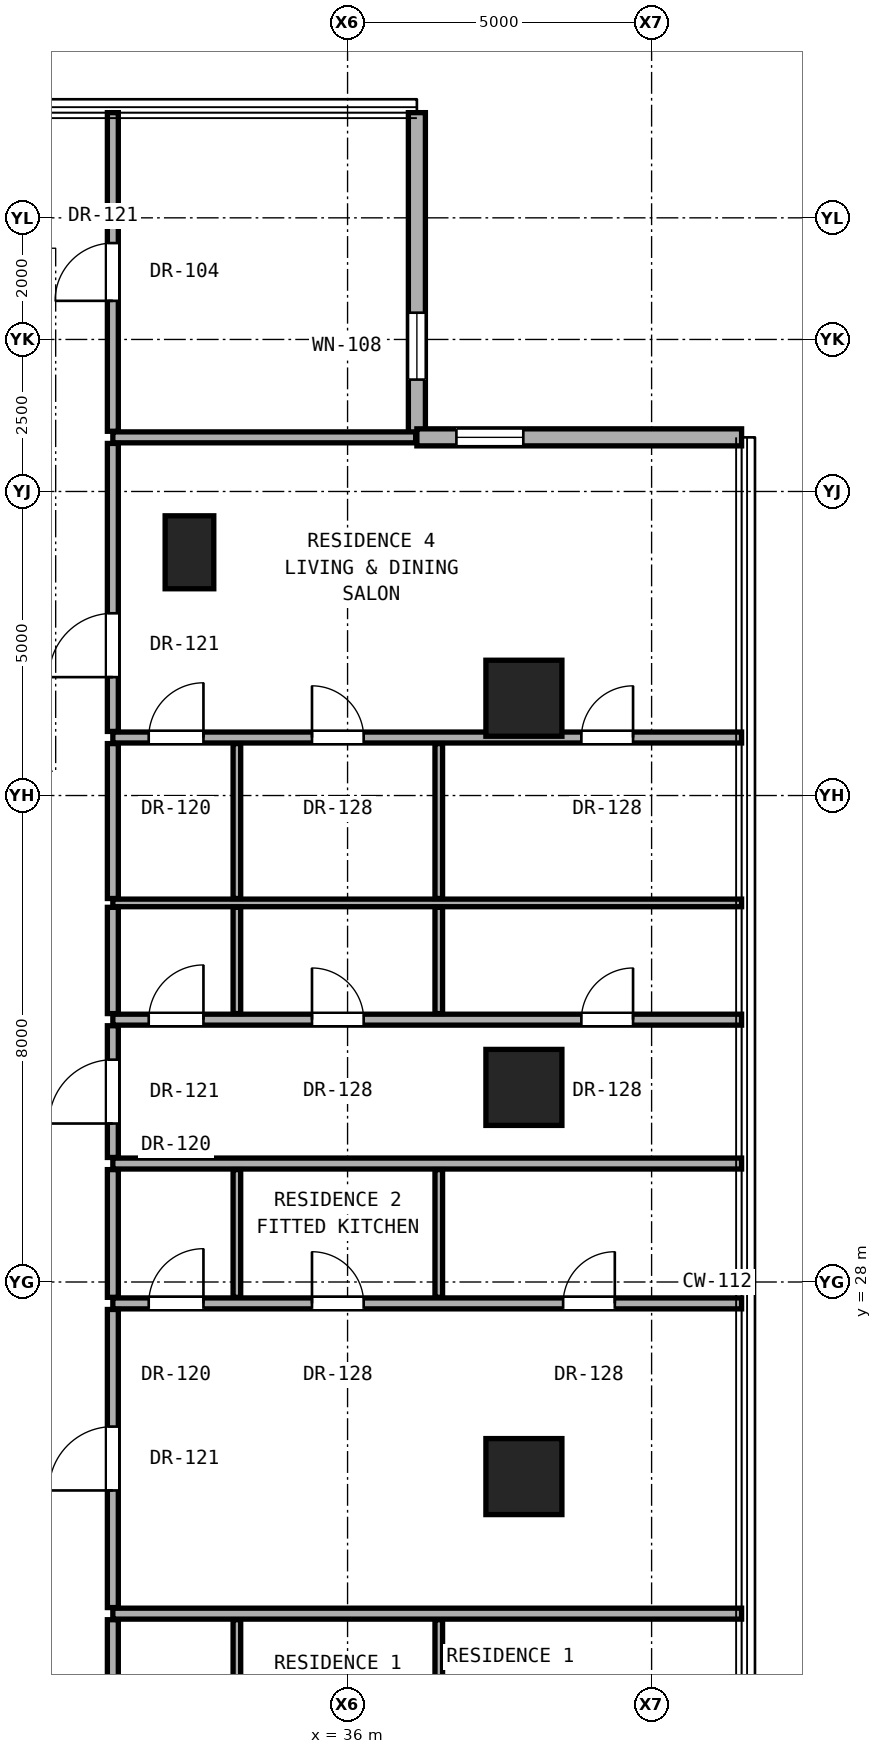
"""IFC4 building model, lengths in metres.
Left out: names, types, materials, properties, quantities, classifications, styles, units other than length and angle.
Written with IfcOpenShell. Run it as: python <this file> out.ifc"""

import sys

from ifc_helpers import new_model, si_unit, direction, frame, frame_2d, origin, origin_2d, place, context, subcontext, project, spatial, rectangle, hollow_rectangle, extrude, element, fill, save


model = new_model("IFC4")
c1 = context("Model", 3, precision=1e-05, world=origin(), true_north=direction((0.0, 1.0)))
c2 = subcontext(c1, "Body", "Model", "MODEL_VIEW")
j1 = project(units=[si_unit("LENGTHUNIT", "METRE"), si_unit("PLANEANGLEUNIT", "RADIAN")], contexts=[c1])
p1 = place(None, origin())
s1 = spatial("IfcSite", under=j1, at=p1, CompositionType="ELEMENT")
p2 = place(p1, origin())
s2 = spatial("IfcBuilding", under=s1, at=p2, CompositionType="ELEMENT")
p3 = place(p2, frame((0.0, 0.0, 68.6)))
s3 = spatial("IfcBuildingStorey", under=s2, at=p3, CompositionType="ELEMENT", Elevation=68.6)
for number, where, z_axis, x_axis in (
    (1, (38.9, 24.8, 0.0), (0.0, 0.0, 1.0), (1.0, 0.0, 0.0)),
    (2, (38.9, 31.2, 0.0), (0.0, 0.0, 1.0), (1.0, 0.0, 0.0)),
    (3, (38.9, 37.6, 0.0), (0.0, 0.0, 1.0), (1.0, 0.0, 0.0)),
):
    element("IfcColumn", number, at=place(p3, frame(where, z_axis=z_axis, x_axis=x_axis)), inside=s3, PredefinedType="COLUMN", context=c2, shape_type="SweptSolid", body=[
        extrude(hollow_rectangle(XDim=1.25, YDim=1.25, WallThickness=0.07, at=origin_2d()), origin(), (0.0, 0.0, 1.0), 3.3),
    ])
p4 = place(p3, frame((33.4, 40.0, 0.0), z_axis=(0.0, 0.0, 1.0), x_axis=(1.0, 0.0, 0.0)))
e4 = element("IfcColumn", 4, at=p4, inside=s3, PredefinedType="PILASTER", context=c2, shape_type="SweptSolid", body=[
    extrude(rectangle(XDim=0.8, YDim=1.2, at=origin_2d()), origin(), (0.0, 0.0, 1.0), 3.3),
])
p5 = place(p3, frame((37.14, 41.89, 0.0), z_axis=(0.0, 0.0, 1.0), x_axis=(0.0, 1.0, 0.0)))
e5 = element("IfcWall", 5, at=p5, inside=s3, PredefinedType="SOLIDWALL", context=c2, shape_type="SweptSolid", body=[
    extrude(rectangle(XDim=5.34, YDim=0.28, at=frame_2d((2.67, 0.0))), origin(), (0.0, 0.0, 1.0), 3.04),
])
p6 = place(p5, frame((0.95, 0.0, 0.85)))
e6 = element("IfcOpeningElement", 6, at=p6, cuts=e5, PredefinedType="OPENING", context=c2, shape_type="SweptSolid", body=[
    extrude(rectangle(XDim=1.1, YDim=2.0, at=frame_2d((0.55, 1.0))), frame((0.0, 0.15, 0.0), z_axis=(0.0, -1.0, 0.0), x_axis=(1.0, 0.0, 0.0)), (0.0, 0.0, 1.0), 0.3),
])
p7 = place(p3, frame((42.48, 41.89, 0.0), z_axis=(0.0, 0.0, 1.0), x_axis=(-1.0, 0.0, 0.0)))
e7 = element("IfcWall", 7, at=p7, inside=s3, PredefinedType="SOLIDWALL", context=c2, shape_type="SweptSolid", body=[
    extrude(rectangle(XDim=5.34, YDim=0.28, at=frame_2d((2.67, 0.0))), origin(), (0.0, 0.0, 1.0), 3.04),
])
p8 = place(p7, frame((3.59, 0.0, 0.85)))
e8 = element("IfcOpeningElement", 8, at=p8, cuts=e7, PredefinedType="OPENING", context=c2, shape_type="SweptSolid", body=[
    extrude(rectangle(XDim=1.1, YDim=2.0, at=frame_2d((0.55, 1.0))), frame((0.0, 0.15, 0.0), z_axis=(0.0, -1.0, 0.0), x_axis=(1.0, 0.0, 0.0)), (0.0, 0.0, 1.0), 0.3),
])
p9 = place(p3, frame((32.14, 22.546, 0.0), z_axis=(0.0, 0.0, 1.0), x_axis=(1.0, 0.0, 0.0)))
e9 = element("IfcWall", 9, at=p9, inside=s3, PredefinedType="PARTITIONING", context=c2, shape_type="SweptSolid", body=[
    extrude(rectangle(XDim=10.34, YDim=0.18, at=frame_2d((5.17, 0.0))), origin(), (0.0, 0.0, 1.0), 2.125),
])
p10 = place(p3, frame((32.14, 27.648, 0.0), z_axis=(0.0, 0.0, 1.0), x_axis=(1.0, 0.0, 0.0)))
e10 = element("IfcWall", 10, at=p10, inside=s3, PredefinedType="PARTITIONING", context=c2, shape_type="SweptSolid", body=[
    extrude(rectangle(XDim=10.34, YDim=0.18, at=frame_2d((5.17, 0.0))), origin(), (0.0, 0.0, 1.0), 2.125),
])
p11 = place(p10, frame((7.405, 0.0, 0.0)))
e11 = element("IfcOpeningElement", 11, at=p11, cuts=e10, PredefinedType="OPENING", context=c2, shape_type="SweptSolid", body=[
    extrude(rectangle(XDim=0.85, YDim=2.01, at=frame_2d((0.425, 1.005))), frame((0.0, 0.1, 0.0), z_axis=(0.0, -1.0, 0.0), x_axis=(1.0, 0.0, 0.0)), (0.0, 0.0, 1.0), 0.2),
])
p12 = place(p10, frame((3.275, 0.0, 0.0)))
e12 = element("IfcOpeningElement", 12, at=p12, cuts=e10, PredefinedType="OPENING", context=c2, shape_type="SweptSolid", body=[
    extrude(rectangle(XDim=0.85, YDim=2.01, at=frame_2d((0.425, 1.005))), frame((0.0, 0.1, 0.0), z_axis=(0.0, -1.0, 0.0), x_axis=(1.0, 0.0, 0.0)), (0.0, 0.0, 1.0), 0.2),
])
p13 = place(p10, frame((0.59, 0.0, 0.0)))
e13 = element("IfcOpeningElement", 13, at=p13, cuts=e10, PredefinedType="OPENING", context=c2, shape_type="SweptSolid", body=[
    extrude(rectangle(XDim=0.9, YDim=2.1, at=frame_2d((0.45, 1.05))), frame((0.0, 0.1, 0.0), z_axis=(0.0, -1.0, 0.0), x_axis=(1.0, 0.0, 0.0)), (0.0, 0.0, 1.0), 0.2),
])
p14 = place(p3, frame((32.14, 29.948, 0.0), z_axis=(0.0, 0.0, 1.0), x_axis=(1.0, 0.0, 0.0)))
e14 = element("IfcWall", 14, at=p14, inside=s3, PredefinedType="PARTITIONING", context=c2, shape_type="SweptSolid", body=[
    extrude(rectangle(XDim=10.34, YDim=0.18, at=frame_2d((5.17, 0.0))), origin(), (0.0, 0.0, 1.0), 2.125),
])
p15 = place(p3, frame((32.14, 32.314, 0.0), z_axis=(0.0, 0.0, 1.0), x_axis=(1.0, 0.0, 0.0)))
e15 = element("IfcWall", 15, at=p15, inside=s3, PredefinedType="PARTITIONING", context=c2, shape_type="SweptSolid", body=[
    extrude(rectangle(XDim=10.34, YDim=0.18, at=frame_2d((5.17, 0.0))), origin(), (0.0, 0.0, 1.0), 2.125),
])
p16 = place(p15, frame((7.705, 0.0, 0.0)))
e16 = element("IfcOpeningElement", 16, at=p16, cuts=e15, PredefinedType="OPENING", context=c2, shape_type="SweptSolid", body=[
    extrude(rectangle(XDim=0.85, YDim=2.01, at=frame_2d((0.425, 1.005))), frame((0.0, 0.1, 0.0), z_axis=(0.0, -1.0, 0.0), x_axis=(1.0, 0.0, 0.0)), (0.0, 0.0, 1.0), 0.2),
])
p17 = place(p15, frame((3.275, 0.0, 0.0)))
e17 = element("IfcOpeningElement", 17, at=p17, cuts=e15, PredefinedType="OPENING", context=c2, shape_type="SweptSolid", body=[
    extrude(rectangle(XDim=0.85, YDim=2.01, at=frame_2d((0.425, 1.005))), frame((0.0, 0.1, 0.0), z_axis=(0.0, -1.0, 0.0), x_axis=(1.0, 0.0, 0.0)), (0.0, 0.0, 1.0), 0.2),
])
p18 = place(p15, frame((0.59, 0.0, 0.0)))
e18 = element("IfcOpeningElement", 18, at=p18, cuts=e15, PredefinedType="OPENING", context=c2, shape_type="SweptSolid", body=[
    extrude(rectangle(XDim=0.9, YDim=2.1, at=frame_2d((0.45, 1.05))), frame((0.0, 0.1, 0.0), z_axis=(0.0, -1.0, 0.0), x_axis=(1.0, 0.0, 0.0)), (0.0, 0.0, 1.0), 0.2),
])
p19 = place(p3, frame((32.14, 34.234, 0.0), z_axis=(0.0, 0.0, 1.0), x_axis=(1.0, 0.0, 0.0)))
e19 = element("IfcWall", 19, at=p19, inside=s3, PredefinedType="PARTITIONING", context=c2, shape_type="SweptSolid", body=[
    extrude(rectangle(XDim=10.34, YDim=0.125, at=frame_2d((5.17, 0.0))), origin(), (0.0, 0.0, 1.0), 2.125),
])
p20 = place(p3, frame((32.14, 36.954, 0.0), z_axis=(0.0, 0.0, 1.0), x_axis=(1.0, 0.0, 0.0)))
e20 = element("IfcWall", 20, at=p20, inside=s3, PredefinedType="PARTITIONING", context=c2, shape_type="SweptSolid", body=[
    extrude(rectangle(XDim=10.34, YDim=0.18, at=frame_2d((5.17, 0.0))), origin(), (0.0, 0.0, 1.0), 2.125),
])
p21 = place(p20, frame((7.705, 0.0, 0.0)))
e21 = element("IfcOpeningElement", 21, at=p21, cuts=e20, PredefinedType="OPENING", context=c2, shape_type="SweptSolid", body=[
    extrude(rectangle(XDim=0.85, YDim=2.01, at=frame_2d((0.425, 1.005))), frame((0.0, 0.1, 0.0), z_axis=(0.0, -1.0, 0.0), x_axis=(1.0, 0.0, 0.0)), (0.0, 0.0, 1.0), 0.2),
])
p22 = place(p20, frame((3.275, 0.0, 0.0)))
e22 = element("IfcOpeningElement", 22, at=p22, cuts=e20, PredefinedType="OPENING", context=c2, shape_type="SweptSolid", body=[
    extrude(rectangle(XDim=0.85, YDim=2.01, at=frame_2d((0.425, 1.005))), frame((0.0, 0.1, 0.0), z_axis=(0.0, -1.0, 0.0), x_axis=(1.0, 0.0, 0.0)), (0.0, 0.0, 1.0), 0.2),
])
p23 = place(p20, frame((0.59, 0.0, 0.0)))
e23 = element("IfcOpeningElement", 23, at=p23, cuts=e20, PredefinedType="OPENING", context=c2, shape_type="SweptSolid", body=[
    extrude(rectangle(XDim=0.9, YDim=2.1, at=frame_2d((0.45, 1.05))), frame((0.0, 0.1, 0.0), z_axis=(0.0, -1.0, 0.0), x_axis=(1.0, 0.0, 0.0)), (0.0, 0.0, 1.0), 0.2),
])
p24 = place(p3, frame((32.14, 41.89, 0.0), z_axis=(0.0, 0.0, 1.0), x_axis=(1.0, 0.0, 0.0)))
e24 = element("IfcWall", 24, at=p24, inside=s3, PredefinedType="PARTITIONING", context=c2, shape_type="SweptSolid", body=[
    extrude(rectangle(XDim=4.98, YDim=0.18, at=frame_2d((2.49, 0.0))), origin(), (0.0, 0.0, 1.0), 3.06),
])
p25 = place(p3, frame((32.14, 19.926, 0.0), z_axis=(0.0, 0.0, 1.0), x_axis=(0.0, 1.0, 0.0)))
e25 = element("IfcWall", 25, at=p25, inside=s3, PredefinedType="PARTITIONING", context=c2, shape_type="SweptSolid", body=[
    extrude(rectangle(XDim=2.52, YDim=0.18, at=frame_2d((1.26, 0.0))), origin(), (0.0, 0.0, 1.0), 3.06),
])
p26 = place(p3, frame((32.14, 22.646, 0.0), z_axis=(0.0, 0.0, 1.0), x_axis=(0.0, 1.0, 0.0)))
e26 = element("IfcWall", 26, at=p26, inside=s3, PredefinedType="PARTITIONING", context=c2, shape_type="SweptSolid", body=[
    extrude(rectangle(XDim=4.902, YDim=0.18, at=frame_2d((2.451, 0.0))), origin(), (0.0, 0.0, 1.0), 2.279),
])
p27 = place(p26, frame((1.926, 0.0, 0.0)))
e27 = element("IfcOpeningElement", 27, at=p27, cuts=e26, PredefinedType="OPENING", context=c2, shape_type="SweptSolid", body=[
    extrude(rectangle(XDim=1.05, YDim=2.2, at=frame_2d((0.525, 1.1))), frame((0.0, 0.1, 0.0), z_axis=(0.0, -1.0, 0.0), x_axis=(1.0, 0.0, 0.0)), (0.0, 0.0, 1.0), 0.2),
])
p28 = place(p3, frame((32.14, 27.748, 0.0), z_axis=(0.0, 0.0, 1.0), x_axis=(0.0, 1.0, 0.0)))
e28 = element("IfcWall", 28, at=p28, inside=s3, PredefinedType="PARTITIONING", context=c2, shape_type="SweptSolid", body=[
    extrude(rectangle(XDim=2.1, YDim=0.18, at=frame_2d((1.05, 0.0))), origin(), (0.0, 0.0, 1.0), 3.06),
])
p29 = place(p3, frame((32.14, 30.048, 0.0), z_axis=(0.0, 0.0, 1.0), x_axis=(0.0, 1.0, 0.0)))
e29 = element("IfcWall", 29, at=p29, inside=s3, PredefinedType="PARTITIONING", context=c2, shape_type="SweptSolid", body=[
    extrude(rectangle(XDim=2.166, YDim=0.18, at=frame_2d((1.083, 0.0))), origin(), (0.0, 0.0, 1.0), 2.279),
])
p30 = place(p29, frame((0.558, 0.0, 0.0)))
e30 = element("IfcOpeningElement", 30, at=p30, cuts=e29, PredefinedType="OPENING", context=c2, shape_type="SweptSolid", body=[
    extrude(rectangle(XDim=1.05, YDim=2.2, at=frame_2d((0.525, 1.1))), frame((0.0, 0.1, 0.0), z_axis=(0.0, -1.0, 0.0), x_axis=(1.0, 0.0, 0.0)), (0.0, 0.0, 1.0), 0.2),
])
p31 = place(p3, frame((32.14, 32.414, 0.0), z_axis=(0.0, 0.0, 1.0), x_axis=(0.0, 1.0, 0.0)))
e31 = element("IfcWall", 31, at=p31, inside=s3, PredefinedType="PARTITIONING", context=c2, shape_type="SweptSolid", body=[
    extrude(rectangle(XDim=1.748, YDim=0.18, at=frame_2d((0.874, 0.0))), origin(), (0.0, 0.0, 1.0), 3.06),
])
p32 = place(p3, frame((32.14, 34.306, 0.0), z_axis=(0.0, 0.0, 1.0), x_axis=(0.0, 1.0, 0.0)))
e32 = element("IfcWall", 32, at=p32, inside=s3, PredefinedType="PARTITIONING", context=c2, shape_type="SweptSolid", body=[
    extrude(rectangle(XDim=2.548, YDim=0.18, at=frame_2d((1.274, 0.0))), origin(), (0.0, 0.0, 1.0), 3.06),
])
p33 = place(p3, frame((32.14, 37.054, 0.0), z_axis=(0.0, 0.0, 1.0), x_axis=(0.0, 1.0, 0.0)))
e33 = element("IfcWall", 33, at=p33, inside=s3, PredefinedType="PARTITIONING", context=c2, shape_type="SweptSolid", body=[
    extrude(rectangle(XDim=4.736, YDim=0.18, at=frame_2d((2.368, 0.0))), origin(), (0.0, 0.0, 1.0), 2.436),
])
p34 = place(p33, frame((0.893, 0.0, 0.0)))
e34 = element("IfcOpeningElement", 34, at=p34, cuts=e33, PredefinedType="OPENING", context=c2, shape_type="SweptSolid", body=[
    extrude(rectangle(XDim=1.05, YDim=2.2, at=frame_2d((0.525, 1.1))), frame((0.0, 0.1, 0.0), z_axis=(0.0, -1.0, 0.0), x_axis=(1.0, 0.0, 0.0)), (0.0, 0.0, 1.0), 0.2),
])
p35 = place(p3, frame((32.14, 41.99, 0.0), z_axis=(0.0, 0.0, 1.0), x_axis=(0.0, 1.0, 0.0)))
e35 = element("IfcWall", 35, at=p35, inside=s3, PredefinedType="PARTITIONING", context=c2, shape_type="SweptSolid", body=[
    extrude(rectangle(XDim=5.24, YDim=0.18, at=frame_2d((2.62, 0.0))), origin(), (0.0, 0.0, 1.0), 3.06),
])
p36 = place(p35, frame((2.145, 0.0, 0.0)))
e36 = element("IfcOpeningElement", 36, at=p36, cuts=e35, PredefinedType="OPENING", context=c2, shape_type="SweptSolid", body=[
    extrude(rectangle(XDim=0.95, YDim=2.15, at=frame_2d((0.475, 1.075))), frame((0.0, 0.1, 0.0), z_axis=(0.0, -1.0, 0.0), x_axis=(1.0, 0.0, 0.0)), (0.0, 0.0, 1.0), 0.2),
])
p37 = place(p3, frame((34.18, 19.926, 0.0), z_axis=(0.0, 0.0, 1.0), x_axis=(0.0, 1.0, 0.0)))
e37 = element("IfcWall", 37, at=p37, inside=s3, PredefinedType="PARTITIONING", context=c2, shape_type="SweptSolid", body=[
    extrude(rectangle(XDim=2.52, YDim=0.125, at=frame_2d((1.26, 0.0))), origin(), (0.0, 0.0, 1.0), 3.06),
])
p38 = place(p3, frame((34.18, 27.748, 0.0), z_axis=(0.0, 0.0, 1.0), x_axis=(0.0, 1.0, 0.0)))
e38 = element("IfcWall", 38, at=p38, inside=s3, PredefinedType="PARTITIONING", context=c2, shape_type="SweptSolid", body=[
    extrude(rectangle(XDim=2.1, YDim=0.125, at=frame_2d((1.05, 0.0))), origin(), (0.0, 0.0, 1.0), 3.06),
])
p39 = place(p3, frame((34.18, 32.414, 0.0), z_axis=(0.0, 0.0, 1.0), x_axis=(0.0, 1.0, 0.0)))
e39 = element("IfcWall", 39, at=p39, inside=s3, PredefinedType="PARTITIONING", context=c2, shape_type="SweptSolid", body=[
    extrude(rectangle(XDim=1.748, YDim=0.125, at=frame_2d((0.874, 0.0))), origin(), (0.0, 0.0, 1.0), 3.06),
])
p40 = place(p3, frame((34.18, 34.306, 0.0), z_axis=(0.0, 0.0, 1.0), x_axis=(0.0, 1.0, 0.0)))
e40 = element("IfcWall", 40, at=p40, inside=s3, PredefinedType="PARTITIONING", context=c2, shape_type="SweptSolid", body=[
    extrude(rectangle(XDim=2.548, YDim=0.125, at=frame_2d((1.274, 0.0))), origin(), (0.0, 0.0, 1.0), 3.06),
])
p41 = place(p3, frame((37.5, 19.926, 0.0), z_axis=(0.0, 0.0, 1.0), x_axis=(0.0, 1.0, 0.0)))
e41 = element("IfcWall", 41, at=p41, inside=s3, PredefinedType="PARTITIONING", context=c2, shape_type="SweptSolid", body=[
    extrude(rectangle(XDim=2.52, YDim=0.125, at=frame_2d((1.26, 0.0))), origin(), (0.0, 0.0, 1.0), 3.06),
])
p42 = place(p3, frame((37.5, 27.748, 0.0), z_axis=(0.0, 0.0, 1.0), x_axis=(0.0, 1.0, 0.0)))
e42 = element("IfcWall", 42, at=p42, inside=s3, PredefinedType="PARTITIONING", context=c2, shape_type="SweptSolid", body=[
    extrude(rectangle(XDim=2.1, YDim=0.125, at=frame_2d((1.05, 0.0))), origin(), (0.0, 0.0, 1.0), 3.06),
])
p43 = place(p3, frame((37.5, 32.414, 0.0), z_axis=(0.0, 0.0, 1.0), x_axis=(0.0, 1.0, 0.0)))
e43 = element("IfcWall", 43, at=p43, inside=s3, PredefinedType="PARTITIONING", context=c2, shape_type="SweptSolid", body=[
    extrude(rectangle(XDim=1.748, YDim=0.125, at=frame_2d((0.874, 0.0))), origin(), (0.0, 0.0, 1.0), 3.06),
])
p44 = place(p3, frame((37.5, 34.306, 0.0), z_axis=(0.0, 0.0, 1.0), x_axis=(0.0, 1.0, 0.0)))
e44 = element("IfcWall", 44, at=p44, inside=s3, PredefinedType="PARTITIONING", context=c2, shape_type="SweptSolid", body=[
    extrude(rectangle(XDim=2.548, YDim=0.125, at=frame_2d((1.274, 0.0))), origin(), (0.0, 0.0, 1.0), 3.06),
])
p45 = place(p6, origin())
e45 = element("IfcWindow", 45, at=p45, inside=s3, PartitioningType="SINGLE_PANEL", PredefinedType="WINDOW", context=c2, shape_type="SweptSolid", body=[
    extrude(rectangle(XDim=1.1, YDim=2.0, at=frame_2d((0.55, 1.0))), frame((0.0, 0.03, 0.0), z_axis=(0.0, -1.0, 0.0), x_axis=(1.0, 0.0, 0.0)), (0.0, 0.0, 1.0), 0.06),
])
fill(e6, e45)
p46 = place(p8, origin())
e46 = element("IfcWindow", 46, at=p46, inside=s3, PartitioningType="SINGLE_PANEL", PredefinedType="WINDOW", context=c2, shape_type="SweptSolid", body=[
    extrude(rectangle(XDim=1.1, YDim=2.0, at=frame_2d((0.55, 1.0))), frame((0.0, 0.03, 0.0), z_axis=(0.0, -1.0, 0.0), x_axis=(1.0, 0.0, 0.0)), (0.0, 0.0, 1.0), 0.06),
])
fill(e8, e46)
p47 = place(p27, origin())
e47 = element("IfcDoor", 47, at=p47, inside=s3, OperationType="SINGLE_SWING_LEFT", PredefinedType="DOOR", context=c2, shape_type="SweptSolid", body=[
    extrude(rectangle(XDim=1.05, YDim=2.2, at=frame_2d((0.525, 1.1))), frame((0.0, 0.025, 0.0), z_axis=(0.0, -1.0, 0.0), x_axis=(1.0, 0.0, 0.0)), (0.0, 0.0, 1.0), 0.05),
])
fill(e27, e47)
p48 = place(p11, origin())
e48 = element("IfcDoor", 48, at=p48, inside=s3, OperationType="SINGLE_SWING_RIGHT", PredefinedType="DOOR", context=c2, shape_type="SweptSolid", body=[
    extrude(rectangle(XDim=0.85, YDim=2.01, at=frame_2d((0.425, 1.005))), frame((0.0, 0.025, 0.0), z_axis=(0.0, -1.0, 0.0), x_axis=(1.0, 0.0, 0.0)), (0.0, 0.0, 1.0), 0.05),
])
fill(e11, e48)
p49 = place(p12, origin())
e49 = element("IfcDoor", 49, at=p49, inside=s3, OperationType="SINGLE_SWING_LEFT", PredefinedType="DOOR", context=c2, shape_type="SweptSolid", body=[
    extrude(rectangle(XDim=0.85, YDim=2.01, at=frame_2d((0.425, 1.005))), frame((0.0, 0.025, 0.0), z_axis=(0.0, -1.0, 0.0), x_axis=(1.0, 0.0, 0.0)), (0.0, 0.0, 1.0), 0.05),
])
fill(e12, e49)
p50 = place(p13, origin())
e50 = element("IfcDoor", 50, at=p50, inside=s3, OperationType="SINGLE_SWING_RIGHT", PredefinedType="DOOR", context=c2, shape_type="SweptSolid", body=[
    extrude(rectangle(XDim=0.9, YDim=2.1, at=frame_2d((0.45, 1.05))), frame((0.0, 0.025, 0.0), z_axis=(0.0, -1.0, 0.0), x_axis=(1.0, 0.0, 0.0)), (0.0, 0.0, 1.0), 0.05),
])
fill(e13, e50)
p51 = place(p30, origin())
e51 = element("IfcDoor", 51, at=p51, inside=s3, OperationType="SINGLE_SWING_LEFT", PredefinedType="DOOR", context=c2, shape_type="SweptSolid", body=[
    extrude(rectangle(XDim=1.05, YDim=2.2, at=frame_2d((0.525, 1.1))), frame((0.0, 0.025, 0.0), z_axis=(0.0, -1.0, 0.0), x_axis=(1.0, 0.0, 0.0)), (0.0, 0.0, 1.0), 0.05),
])
fill(e30, e51)
p52 = place(p16, origin())
e52 = element("IfcDoor", 52, at=p52, inside=s3, OperationType="SINGLE_SWING_RIGHT", PredefinedType="DOOR", context=c2, shape_type="SweptSolid", body=[
    extrude(rectangle(XDim=0.85, YDim=2.01, at=frame_2d((0.425, 1.005))), frame((0.0, 0.025, 0.0), z_axis=(0.0, -1.0, 0.0), x_axis=(1.0, 0.0, 0.0)), (0.0, 0.0, 1.0), 0.05),
])
fill(e16, e52)
p53 = place(p17, origin())
e53 = element("IfcDoor", 53, at=p53, inside=s3, OperationType="SINGLE_SWING_LEFT", PredefinedType="DOOR", context=c2, shape_type="SweptSolid", body=[
    extrude(rectangle(XDim=0.85, YDim=2.01, at=frame_2d((0.425, 1.005))), frame((0.0, 0.025, 0.0), z_axis=(0.0, -1.0, 0.0), x_axis=(1.0, 0.0, 0.0)), (0.0, 0.0, 1.0), 0.05),
])
fill(e17, e53)
p54 = place(p18, origin())
e54 = element("IfcDoor", 54, at=p54, inside=s3, OperationType="SINGLE_SWING_RIGHT", PredefinedType="DOOR", context=c2, shape_type="SweptSolid", body=[
    extrude(rectangle(XDim=0.9, YDim=2.1, at=frame_2d((0.45, 1.05))), frame((0.0, 0.025, 0.0), z_axis=(0.0, -1.0, 0.0), x_axis=(1.0, 0.0, 0.0)), (0.0, 0.0, 1.0), 0.05),
])
fill(e18, e54)
p55 = place(p34, origin())
e55 = element("IfcDoor", 55, at=p55, inside=s3, OperationType="SINGLE_SWING_LEFT", PredefinedType="DOOR", context=c2, shape_type="SweptSolid", body=[
    extrude(rectangle(XDim=1.05, YDim=2.2, at=frame_2d((0.525, 1.1))), frame((0.0, 0.025, 0.0), z_axis=(0.0, -1.0, 0.0), x_axis=(1.0, 0.0, 0.0)), (0.0, 0.0, 1.0), 0.05),
])
fill(e34, e55)
p56 = place(p21, origin())
e56 = element("IfcDoor", 56, at=p56, inside=s3, OperationType="SINGLE_SWING_RIGHT", PredefinedType="DOOR", context=c2, shape_type="SweptSolid", body=[
    extrude(rectangle(XDim=0.85, YDim=2.01, at=frame_2d((0.425, 1.005))), frame((0.0, 0.025, 0.0), z_axis=(0.0, -1.0, 0.0), x_axis=(1.0, 0.0, 0.0)), (0.0, 0.0, 1.0), 0.05),
])
fill(e21, e56)
p57 = place(p22, origin())
e57 = element("IfcDoor", 57, at=p57, inside=s3, OperationType="SINGLE_SWING_LEFT", PredefinedType="DOOR", context=c2, shape_type="SweptSolid", body=[
    extrude(rectangle(XDim=0.85, YDim=2.01, at=frame_2d((0.425, 1.005))), frame((0.0, 0.025, 0.0), z_axis=(0.0, -1.0, 0.0), x_axis=(1.0, 0.0, 0.0)), (0.0, 0.0, 1.0), 0.05),
])
fill(e22, e57)
p58 = place(p23, origin())
e58 = element("IfcDoor", 58, at=p58, inside=s3, OperationType="SINGLE_SWING_RIGHT", PredefinedType="DOOR", context=c2, shape_type="SweptSolid", body=[
    extrude(rectangle(XDim=0.9, YDim=2.1, at=frame_2d((0.45, 1.05))), frame((0.0, 0.025, 0.0), z_axis=(0.0, -1.0, 0.0), x_axis=(1.0, 0.0, 0.0)), (0.0, 0.0, 1.0), 0.05),
])
fill(e23, e58)
p59 = place(p36, origin())
e59 = element("IfcDoor", 59, at=p59, inside=s3, OperationType="SINGLE_SWING_LEFT", PredefinedType="DOOR", context=c2, shape_type="SweptSolid", body=[
    extrude(rectangle(XDim=0.95, YDim=2.15, at=frame_2d((0.475, 1.075))), frame((0.0, 0.025, 0.0), z_axis=(0.0, -1.0, 0.0), x_axis=(1.0, 0.0, 0.0)), (0.0, 0.0, 1.0), 0.05),
])
fill(e36, e59)
save(model, sys.argv[1])
